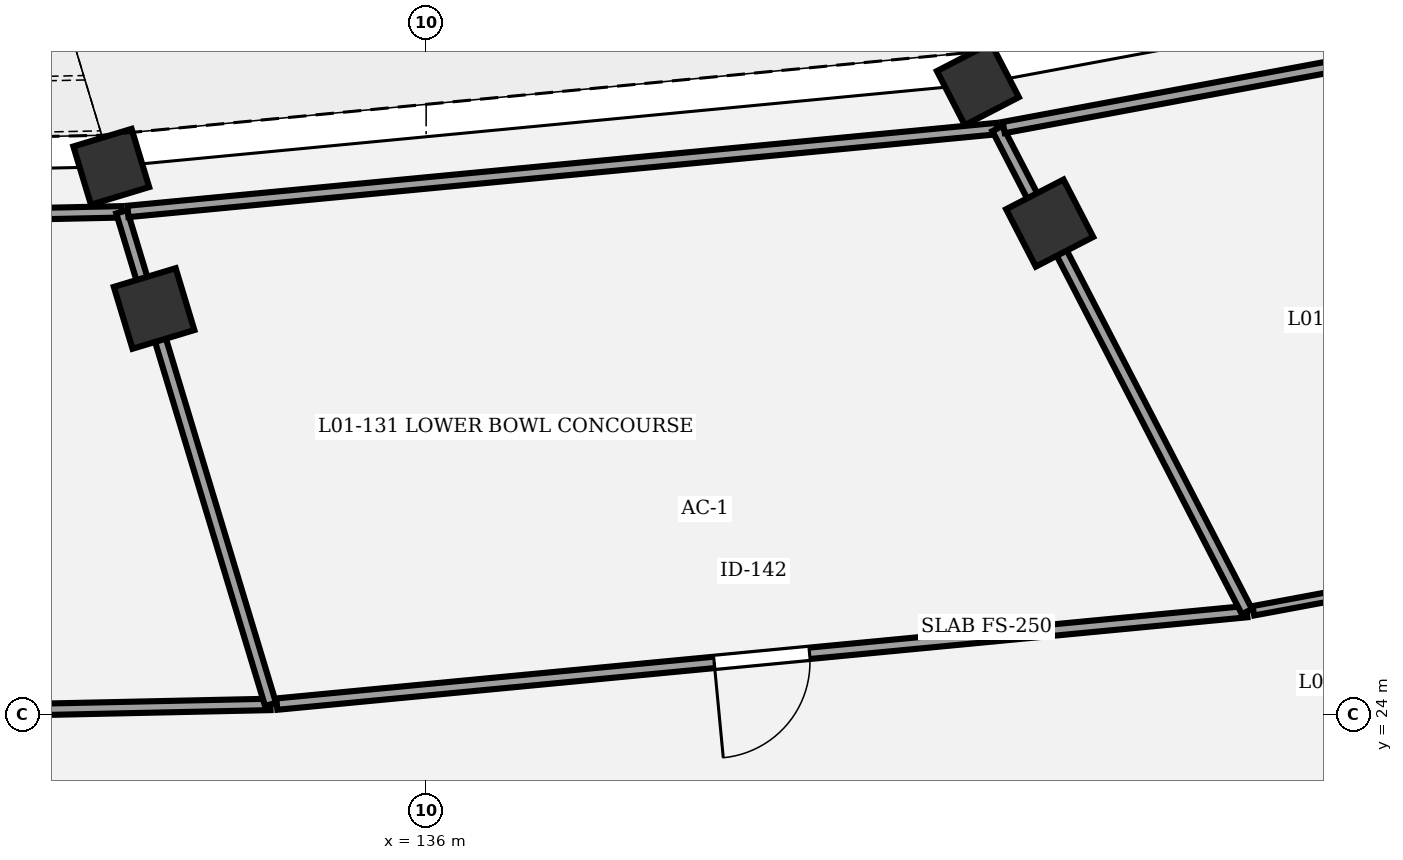
"""IFC4 building model, lengths in metres.
Left out: names, types, materials, properties, quantities, classifications, styles, units other than length and angle.
Written with IfcOpenShell. Run it as: python <this file> out.ifc"""

import sys

from ifc_helpers import new_model, si_unit, direction, frame, frame_2d, origin, origin_2d, place, context, subcontext, project, spatial, rectangle, extrude, element, fill, save


model = new_model("IFC4")
c1 = context("Model", 3, precision=1e-05, world=origin(), true_north=direction((0.0, 1.0)))
c2 = subcontext(c1, "Body", "Model", "MODEL_VIEW")
j1 = project(units=[si_unit("LENGTHUNIT", "METRE"), si_unit("PLANEANGLEUNIT", "RADIAN")], contexts=[c1])
p1 = place(None, origin())
s1 = spatial("IfcSite", under=j1, at=p1, CompositionType="ELEMENT")
p2 = place(p1, origin())
s2 = spatial("IfcBuilding", under=s1, at=p2, CompositionType="ELEMENT")
p3 = place(p2, frame((0.0, 0.0, 5.4)))
s3 = spatial("IfcBuildingStorey", under=s2, at=p3, CompositionType="ELEMENT", Elevation=5.4)
p4 = place(p3, frame((131.857, 31.207, 0.0), z_axis=(0.0, 0.0, 1.0), x_axis=(0.289198876314, -0.957269037387, 0.0)))
e1 = element("IfcColumn", 1, at=p4, inside=s3, PredefinedType="COLUMN", context=c2, shape_type="SweptSolid", body=[
    extrude(rectangle(XDim=0.8, YDim=0.8, at=origin_2d()), origin(), (0.0, 0.0, 1.0), 4.8),
])
p5 = place(p3, frame((132.42, 29.343, 0.0), z_axis=(0.0, 0.0, 1.0), x_axis=(0.289198876314, -0.957269037387, 0.0)))
e2 = element("IfcColumn", 2, at=p5, inside=s3, PredefinedType="COLUMN", context=c2, shape_type="SweptSolid", body=[
    extrude(rectangle(XDim=0.85, YDim=0.85, at=origin_2d()), origin(), (0.0, 0.0, 1.0), 4.8),
])
p6 = place(p3, frame((143.259, 32.294, 0.0), z_axis=(0.0, 0.0, 1.0), x_axis=(0.458959712465, -0.888457079624, 0.0)))
e3 = element("IfcColumn", 3, at=p6, inside=s3, PredefinedType="COLUMN", context=c2, shape_type="SweptSolid", body=[
    extrude(rectangle(XDim=0.8, YDim=0.8, at=origin_2d()), origin(), (0.0, 0.0, 1.0), 4.8),
])
p7 = place(p3, frame((144.204, 30.466, 0.0), z_axis=(0.0, 0.0, 1.0), x_axis=(0.458959712465, -0.888457079624, 0.0)))
e4 = element("IfcColumn", 4, at=p7, inside=s3, PredefinedType="COLUMN", context=c2, shape_type="SweptSolid", body=[
    extrude(rectangle(XDim=0.85, YDim=0.85, at=origin_2d()), origin(), (0.0, 0.0, 1.0), 4.8),
])
p8 = place(p3, frame((133.953, 24.134, 0.0), z_axis=(0.0, 0.0, 1.0), x_axis=(-0.999768266483, -0.021527037261, 0.0)))
e5 = element("IfcWall", 5, at=p8, inside=s3, PredefinedType="PARTITIONING", context=c2, shape_type="SweptSolid", body=[
    extrude(rectangle(XDim=18.917, YDim=0.15, at=frame_2d((9.458, 0.0))), origin(), (0.0, 0.0, 1.0), 3.55),
])
p9 = place(p8, frame((8.868, 0.0, 0.0)))
e6 = element("IfcOpeningElement", 6, at=p9, cuts=e5, PredefinedType="OPENING", context=c2, shape_type="SweptSolid", body=[
    extrude(rectangle(XDim=1.18, YDim=2.3, at=frame_2d((0.59, 1.15))), frame((0.0, 0.085, 0.0), z_axis=(0.0, -1.0, 0.0), x_axis=(1.0, 0.0, 0.0)), (0.0, 0.0, 1.0), 0.17),
])
p10 = place(p3, frame((146.799, 25.355, 0.0), z_axis=(0.0, 0.0, 1.0), x_axis=(-0.995485111947, -0.094917816515, 0.0)))
e7 = element("IfcWall", 7, at=p10, inside=s3, PredefinedType="PARTITIONING", context=c2, shape_type="SweptSolid", body=[
    extrude(rectangle(XDim=12.822, YDim=0.15, at=frame_2d((6.411, 0.0))), origin(), (0.0, 0.0, 1.0), 3.55),
])
p11 = place(p10, frame((5.781, 0.0, 0.0)))
e8 = element("IfcOpeningElement", 8, at=p11, cuts=e7, PredefinedType="OPENING", context=c2, shape_type="SweptSolid", body=[
    extrude(rectangle(XDim=1.26, YDim=2.3, at=frame_2d((0.63, 1.15))), frame((0.0, 0.085, 0.0), z_axis=(0.0, -1.0, 0.0), x_axis=(1.0, 0.0, 0.0)), (0.0, 0.0, 1.0), 0.17),
])
p12 = place(p3, frame((157.732, 27.386, 0.0), z_axis=(0.0, 0.0, 1.0), x_axis=(-0.983097372707, -0.183083466695, 0.0)))
e9 = element("IfcWall", 9, at=p12, inside=s3, PredefinedType="PARTITIONING", context=c2, shape_type="SweptSolid", body=[
    extrude(rectangle(XDim=11.035, YDim=0.125, at=frame_2d((5.517, 0.0))), origin(), (0.0, 0.0, 1.0), 3.55),
])
p13 = place(p12, frame((4.817, 0.0, 0.0)))
e10 = element("IfcOpeningElement", 10, at=p13, cuts=e9, PredefinedType="OPENING", context=c2, shape_type="SweptSolid", body=[
    extrude(rectangle(XDim=1.4, YDim=2.3, at=frame_2d((0.7, 1.15))), frame((0.0, 0.073, 0.0), z_axis=(0.0, -1.0, 0.0), x_axis=(1.0, 0.0, 0.0)), (0.0, 0.0, 1.0), 0.145),
])
p14 = place(p3, frame((115.04, 30.249, 0.0), z_axis=(0.0, 0.0, 1.0), x_axis=(0.99976805362, 0.021536920891, 0.0)))
e11 = element("IfcWall", 11, at=p14, inside=s3, PredefinedType="PARTITIONING", context=c2, shape_type="SweptSolid", body=[
    extrude(rectangle(XDim=16.958, YDim=0.15, at=frame_2d((8.479, 0.0))), origin(), (0.0, 0.0, 1.0), 3.55),
])
p15 = place(p3, frame((131.995, 30.614, 0.0), z_axis=(0.0, 0.0, 1.0), x_axis=(0.289226587364, -0.957260665212, 0.0)))
e12 = element("IfcWall", 12, at=p15, inside=s3, PredefinedType="PARTITIONING", context=c2, shape_type="SweptSolid", body=[
    extrude(rectangle(XDim=6.77, YDim=0.15, at=frame_2d((3.385, 0.0))), origin(), (0.0, 0.0, 1.0), 3.55),
])
p16 = place(p3, frame((132.076, 30.619, 0.0), z_axis=(0.0, 0.0, 1.0), x_axis=(0.995484580871, 0.094923386203, 0.0)))
e13 = element("IfcWall", 13, at=p16, inside=s3, PredefinedType="PARTITIONING", context=c2, shape_type="SweptSolid", body=[
    extrude(rectangle(XDim=11.492, YDim=0.15, at=frame_2d((5.746, 0.0))), origin(), (0.0, 0.0, 1.0), 3.55),
])
p17 = place(p3, frame((143.516, 31.71, 0.0), z_axis=(0.0, 0.0, 1.0), x_axis=(0.458942826051, -0.888465802615, 0.0)))
e14 = element("IfcWall", 14, at=p17, inside=s3, PredefinedType="PARTITIONING", context=c2, shape_type="SweptSolid", body=[
    extrude(rectangle(XDim=7.153, YDim=0.15, at=frame_2d((3.577, 0.0))), origin(), (0.0, 0.0, 1.0), 3.55),
])
p18 = place(p3, frame((143.599, 31.723, 0.0), z_axis=(0.0, 0.0, 1.0), x_axis=(0.98309647403, 0.183088292225, 0.0)))
e15 = element("IfcWall", 15, at=p18, inside=s3, PredefinedType="PARTITIONING", context=c2, shape_type="SweptSolid", body=[
    extrude(rectangle(XDim=9.888, YDim=0.15, at=frame_2d((4.944, 0.0))), origin(), (0.0, 0.0, 1.0), 3.55),
])
p19 = place(p11, origin())
e16 = element("IfcDoor", 16, at=p19, inside=s3, OperationType="SINGLE_SWING_RIGHT", PredefinedType="DOOR", context=c2, shape_type="SweptSolid", body=[
    extrude(rectangle(XDim=1.26, YDim=2.3, at=frame_2d((0.63, 1.15))), frame((0.0, 0.025, 0.0), z_axis=(0.0, -1.0, 0.0), x_axis=(1.0, 0.0, 0.0)), (0.0, 0.0, 1.0), 0.05),
])
fill(e8, e16)
save(model, sys.argv[1])
